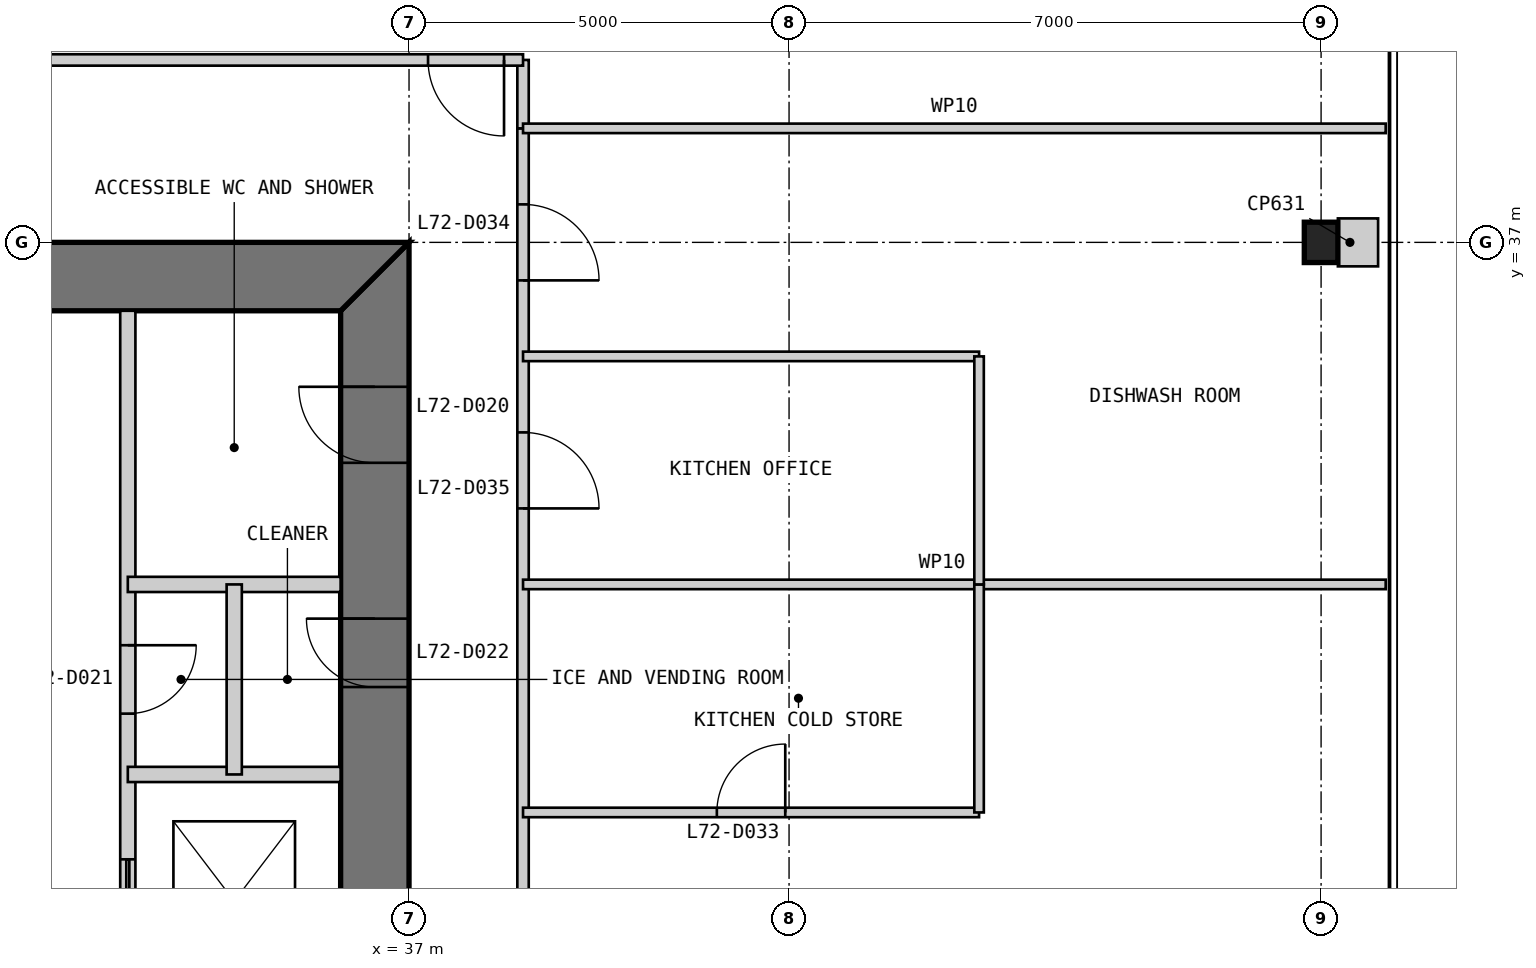
"""IFC4 building model, lengths in metres.
Left out: names, types, materials, properties, quantities, classifications, styles, units other than length and angle.
Written with IfcOpenShell. Run it as: python <this file> out.ifc"""

import sys

from ifc_helpers import new_model, si_unit, direction, frame, frame_2d, origin, origin_2d, place, context, subcontext, project, spatial, polyline, rectangle, i_section, outline, extrude, element, fill, save


model = new_model("IFC4")
c1 = context("Model", 3, precision=1e-05, world=origin(), true_north=direction((0.0, 1.0)))
c2 = subcontext(c1, "Body", "Model", "MODEL_VIEW")
j1 = project(units=[si_unit("LENGTHUNIT", "METRE"), si_unit("PLANEANGLEUNIT", "RADIAN")], contexts=[c1])
p1 = place(None, origin())
s1 = spatial("IfcSite", under=j1, at=p1, CompositionType="ELEMENT")
p2 = place(p1, origin())
s2 = spatial("IfcBuilding", under=s1, at=p2, CompositionType="ELEMENT")
p3 = place(p2, frame((0.0, 0.0, 296.8)))
s3 = spatial("IfcBuildingStorey", under=s2, at=p3, CompositionType="ELEMENT", Elevation=296.8)
p4 = place(p3, frame((49.0, 37.0, 0.0), z_axis=(0.0, 0.0, 1.0), x_axis=(1.0, 0.0, 0.0)))
e1 = element("IfcColumn", 1, at=p4, inside=s3, PredefinedType="COLUMN", context=c2, shape_type="SweptSolid", body=[
    extrude(i_section(OverallWidth=0.442, OverallDepth=0.531, WebThickness=0.066, FlangeThickness=0.106, at=origin_2d()), origin(), (0.0, 0.0, 1.0), 5.0),
])
p5 = place(p3, frame((36.55, 13.9, 0.0), z_axis=(0.0, 0.0, 1.0), x_axis=(0.0, 1.0, 0.0)))
e2 = element("IfcWall", 2, at=p5, inside=s3, PredefinedType="SHEAR", context=c2, shape_type="SweptSolid", body=[
    extrude(outline(polyline([(-0.9, -0.45), (23.1, -0.45), (22.2, 0.45), (0.0, 0.45), (-0.9, -0.45)])), origin(), (0.0, 0.0, 1.0), 5.0),
])
p6 = place(p5, frame((20.2, 0.0, 0.0)))
e3 = element("IfcOpeningElement", 3, at=p6, cuts=e2, PredefinedType="OPENING", context=c2, shape_type="SweptSolid", body=[
    extrude(rectangle(XDim=1.0, YDim=2.2, at=frame_2d((0.5, 1.1))), frame((0.0, 0.46, 0.0), z_axis=(0.0, -1.0, 0.0), x_axis=(1.0, 0.0, 0.0)), (0.0, 0.0, 1.0), 0.92),
])
p7 = place(p5, frame((17.25, 0.0, 0.0)))
e4 = element("IfcOpeningElement", 4, at=p7, cuts=e2, PredefinedType="OPENING", context=c2, shape_type="SweptSolid", body=[
    extrude(rectangle(XDim=0.9, YDim=2.2, at=frame_2d((0.45, 1.1))), frame((0.0, 0.46, 0.0), z_axis=(0.0, -1.0, 0.0), x_axis=(1.0, 0.0, 0.0)), (0.0, 0.0, 1.0), 0.92),
])
p8 = place(p3, frame((37.0, 36.55, 0.0), z_axis=(0.0, 0.0, 1.0), x_axis=(-1.0, 0.0, 0.0)))
e5 = element("IfcWall", 5, at=p8, inside=s3, PredefinedType="SHEAR", context=c2, shape_type="SweptSolid", body=[
    extrude(outline(polyline([(0.0, -0.45), (24.0, -0.45), (23.1, 0.45), (0.9, 0.45), (0.0, -0.45)])), origin(), (0.0, 0.0, 1.0), 5.0),
])
p9 = place(p8, frame((4.9, 0.0, 0.0)))
e6 = element("IfcOpeningElement", 6, at=p9, cuts=e5, PredefinedType="OPENING", context=c2, shape_type="SweptSolid", body=[
    extrude(rectangle(XDim=1.0, YDim=2.2, at=frame_2d((0.5, 1.1))), frame((0.0, 0.46, 0.0), z_axis=(0.0, -1.0, 0.0), x_axis=(1.0, 0.0, 0.0)), (0.0, 0.0, 1.0), 0.92),
])
p10 = place(p8, frame((8.9, 0.0, 0.0)))
e7 = element("IfcOpeningElement", 7, at=p10, cuts=e5, PredefinedType="OPENING", context=c2, shape_type="SweptSolid", body=[
    extrude(rectangle(XDim=1.1, YDim=2.2, at=frame_2d((0.55, 1.1))), frame((0.0, 0.46, 0.0), z_axis=(0.0, -1.0, 0.0), x_axis=(1.0, 0.0, 0.0)), (0.0, 0.0, 1.0), 0.92),
])
p11 = place(p8, frame((15.05, 0.0, 0.0)))
e8 = element("IfcOpeningElement", 8, at=p11, cuts=e5, PredefinedType="OPENING", context=c2, shape_type="SweptSolid", body=[
    extrude(rectangle(XDim=0.9, YDim=2.2, at=frame_2d((0.45, 1.1))), frame((0.0, 0.46, 0.0), z_axis=(0.0, -1.0, 0.0), x_axis=(1.0, 0.0, 0.0)), (0.0, 0.0, 1.0), 0.92),
])
p12 = place(p8, frame((17.9, 0.0, 0.0)))
e9 = element("IfcOpeningElement", 9, at=p12, cuts=e5, PredefinedType="OPENING", context=c2, shape_type="SweptSolid", body=[
    extrude(rectangle(XDim=1.0, YDim=2.2, at=frame_2d((0.5, 1.1))), frame((0.0, 0.46, 0.0), z_axis=(0.0, -1.0, 0.0), x_axis=(1.0, 0.0, 0.0)), (0.0, 0.0, 1.0), 0.92),
])
p13 = place(p8, frame((21.4, 0.0, 0.0)))
e10 = element("IfcOpeningElement", 10, at=p13, cuts=e5, PredefinedType="OPENING", context=c2, shape_type="SweptSolid", body=[
    extrude(rectangle(XDim=1.0, YDim=2.2, at=frame_2d((0.5, 1.1))), frame((0.0, 0.46, 0.0), z_axis=(0.0, -1.0, 0.0), x_axis=(1.0, 0.0, 0.0)), (0.0, 0.0, 1.0), 0.92),
])
p14 = place(p3, frame((33.3, 36.1, 0.0), z_axis=(0.0, 0.0, 1.0), x_axis=(0.0, -1.0, 0.0)))
e11 = element("IfcWall", 11, at=p14, inside=s3, PredefinedType="PARTITIONING", context=c2, shape_type="SweptSolid", body=[
    extrude(rectangle(XDim=16.1, YDim=0.2, at=frame_2d((8.05, 0.0))), origin(), (0.0, 0.0, 1.0), 4.8),
])
p15 = place(p14, frame((4.4, 0.0, 0.0)))
e12 = element("IfcOpeningElement", 12, at=p15, cuts=e11, PredefinedType="OPENING", context=c2, shape_type="SweptSolid", body=[
    extrude(rectangle(XDim=0.9, YDim=2.2, at=frame_2d((0.45, 1.1))), frame((0.0, 0.11, 0.0), z_axis=(0.0, -1.0, 0.0), x_axis=(1.0, 0.0, 0.0)), (0.0, 0.0, 1.0), 0.22),
])
p16 = place(p14, frame((7.217, 0.0, 0.0)))
e13 = element("IfcOpeningElement", 13, at=p16, cuts=e11, PredefinedType="OPENING", context=c2, shape_type="SweptSolid", body=[
    extrude(rectangle(XDim=1.1, YDim=2.2, at=frame_2d((0.55, 1.1))), frame((0.0, 0.11, 0.0), z_axis=(0.0, -1.0, 0.0), x_axis=(1.0, 0.0, 0.0)), (0.0, 0.0, 1.0), 0.22),
])
p17 = place(p14, frame((10.55, 0.0, 0.0)))
e14 = element("IfcOpeningElement", 14, at=p17, cuts=e11, PredefinedType="OPENING", context=c2, shape_type="SweptSolid", body=[
    extrude(rectangle(XDim=1.1, YDim=2.2, at=frame_2d((0.55, 1.1))), frame((0.0, 0.11, 0.0), z_axis=(0.0, -1.0, 0.0), x_axis=(1.0, 0.0, 0.0)), (0.0, 0.0, 1.0), 0.22),
])
p18 = place(p14, frame((13.883, 0.0, 0.0)))
e15 = element("IfcOpeningElement", 15, at=p18, cuts=e11, PredefinedType="OPENING", context=c2, shape_type="SweptSolid", body=[
    extrude(rectangle(XDim=1.1, YDim=2.2, at=frame_2d((0.55, 1.1))), frame((0.0, 0.11, 0.0), z_axis=(0.0, -1.0, 0.0), x_axis=(1.0, 0.0, 0.0)), (0.0, 0.0, 1.0), 0.22),
])
for number, where, z_axis, x_axis in (
    (16, (36.1, 30.0, 0.0), (0.0, 0.0, 1.0), (-1.0, 0.0, 0.0)),
    (17, (36.1, 32.5, 0.0), (0.0, 0.0, 1.0), (-1.0, 0.0, 0.0)),
):
    element("IfcWall", number, at=place(p3, frame(where, z_axis=z_axis, x_axis=x_axis)), inside=s3, PredefinedType="PARTITIONING", context=c2, shape_type="SweptSolid", body=[
        extrude(rectangle(XDim=2.8, YDim=0.2, at=frame_2d((1.4, 0.0))), origin(), (0.0, 0.0, 1.0), 4.8),
    ])
p19 = place(p3, frame((34.7, 32.5, 0.0), z_axis=(0.0, 0.0, 1.0), x_axis=(0.0, -1.0, 0.0)))
e18 = element("IfcWall", 18, at=p19, inside=s3, PredefinedType="PARTITIONING", context=c2, shape_type="SweptSolid", body=[
    extrude(rectangle(XDim=2.5, YDim=0.2, at=frame_2d((1.25, 0.0))), origin(), (0.0, 0.0, 1.0), 4.8),
])
p20 = place(p3, frame((38.5, 11.5, 0.0), z_axis=(0.0, 0.0, 1.0), x_axis=(0.0, 1.0, 0.0)))
e19 = element("IfcWall", 19, at=p20, inside=s3, PredefinedType="PARTITIONING", context=c2, shape_type="SweptSolid", body=[
    extrude(rectangle(XDim=27.0, YDim=0.15, at=frame_2d((13.5, 0.0))), origin(), (0.0, 0.0, 1.0), 4.8),
])
p21 = place(p20, frame((8.5, 0.0, 0.0)))
e20 = element("IfcOpeningElement", 20, at=p21, cuts=e19, PredefinedType="OPENING", context=c2, shape_type="SweptSolid", body=[
    extrude(rectangle(XDim=1.0, YDim=2.2, at=frame_2d((0.5, 1.1))), frame((0.0, 0.085, 0.0), z_axis=(0.0, -1.0, 0.0), x_axis=(1.0, 0.0, 0.0)), (0.0, 0.0, 1.0), 0.17),
])
p22 = place(p20, frame((25.0, 0.0, 0.0)))
e21 = element("IfcOpeningElement", 21, at=p22, cuts=e19, PredefinedType="OPENING", context=c2, shape_type="SweptSolid", body=[
    extrude(rectangle(XDim=1.0, YDim=2.2, at=frame_2d((0.5, 1.1))), frame((0.0, 0.085, 0.0), z_axis=(0.0, -1.0, 0.0), x_axis=(1.0, 0.0, 0.0)), (0.0, 0.0, 1.0), 0.17),
])
p23 = place(p20, frame((22.0, 0.0, 0.0)))
e22 = element("IfcOpeningElement", 22, at=p23, cuts=e19, PredefinedType="OPENING", context=c2, shape_type="SweptSolid", body=[
    extrude(rectangle(XDim=1.0, YDim=2.2, at=frame_2d((0.5, 1.1))), frame((0.0, 0.085, 0.0), z_axis=(0.0, -1.0, 0.0), x_axis=(1.0, 0.0, 0.0)), (0.0, 0.0, 1.0), 0.17),
])
p24 = place(p3, frame((44.5, 29.5, 0.0), z_axis=(0.0, 0.0, 1.0), x_axis=(-1.0, 0.0, 0.0)))
e23 = element("IfcWall", 23, at=p24, inside=s3, PredefinedType="PARTITIONING", context=c2, shape_type="SweptSolid", body=[
    extrude(rectangle(XDim=6.0, YDim=0.125, at=frame_2d((3.0, 0.0))), origin(), (0.0, 0.0, 1.0), 4.8),
])
p25 = place(p24, frame((2.55, 0.0, 0.0)))
e24 = element("IfcOpeningElement", 24, at=p25, cuts=e23, PredefinedType="OPENING", context=c2, shape_type="SweptSolid", body=[
    extrude(rectangle(XDim=0.9, YDim=2.2, at=frame_2d((0.45, 1.1))), frame((0.0, 0.073, 0.0), z_axis=(0.0, -1.0, 0.0), x_axis=(1.0, 0.0, 0.0)), (0.0, 0.0, 1.0), 0.145),
])
p26 = place(p3, frame((49.85, 32.5, 0.0), z_axis=(0.0, 0.0, 1.0), x_axis=(-1.0, 0.0, 0.0)))
e25 = element("IfcWall", 25, at=p26, inside=s3, PredefinedType="PARTITIONING", context=c2, shape_type="SweptSolid", body=[
    extrude(rectangle(XDim=11.35, YDim=0.125, at=frame_2d((5.675, 0.0))), origin(), (0.0, 0.0, 1.0), 4.8),
])
p27 = place(p3, frame((44.5, 35.5, 0.0), z_axis=(0.0, 0.0, 1.0), x_axis=(-1.0, 0.0, 0.0)))
e26 = element("IfcWall", 26, at=p27, inside=s3, PredefinedType="PARTITIONING", context=c2, shape_type="SweptSolid", body=[
    extrude(rectangle(XDim=6.0, YDim=0.125, at=frame_2d((3.0, 0.0))), origin(), (0.0, 0.0, 1.0), 4.8),
])
for number, where, z_axis, x_axis in (
    (27, (44.5, 29.5, 0.0), (0.0, 0.0, 1.0), (0.0, 1.0, 0.0)),
    (28, (44.5, 32.5, 0.0), (0.0, 0.0, 1.0), (0.0, 1.0, 0.0)),
):
    element("IfcWall", number, at=place(p3, frame(where, z_axis=z_axis, x_axis=x_axis)), inside=s3, PredefinedType="PARTITIONING", context=c2, shape_type="SweptSolid", body=[
        extrude(rectangle(XDim=3.0, YDim=0.125, at=frame_2d((1.5, 0.0))), origin(), (0.0, 0.0, 1.0), 4.8),
    ])
p28 = place(p3, frame((38.5, 38.5, 0.0), z_axis=(0.0, 0.0, 1.0), x_axis=(0.0, 1.0, 0.0)))
e29 = element("IfcWall", 29, at=p28, inside=s3, PredefinedType="PARTITIONING", context=c2, shape_type="SweptSolid", body=[
    extrude(rectangle(XDim=0.9, YDim=0.15, at=frame_2d((0.45, 0.0))), origin(), (0.0, 0.0, 1.0), 4.8),
])
p29 = place(p3, frame((38.5, 39.4, 0.0), z_axis=(0.0, 0.0, 1.0), x_axis=(-1.0, 0.0, 0.0)))
e30 = element("IfcWall", 30, at=p29, inside=s3, PredefinedType="PARTITIONING", context=c2, shape_type="SweptSolid", body=[
    extrude(rectangle(XDim=27.0, YDim=0.15, at=frame_2d((13.5, 0.0))), origin(), (0.0, 0.0, 1.0), 4.8),
])
p30 = place(p29, frame((0.25, 0.0, 0.0)))
e31 = element("IfcOpeningElement", 31, at=p30, cuts=e30, PredefinedType="OPENING", context=c2, shape_type="SweptSolid", body=[
    extrude(rectangle(XDim=1.0, YDim=2.2, at=frame_2d((0.5, 1.1))), frame((0.0, 0.085, 0.0), z_axis=(0.0, -1.0, 0.0), x_axis=(1.0, 0.0, 0.0)), (0.0, 0.0, 1.0), 0.17),
])
p31 = place(p29, frame((10.75, 0.0, 0.0)))
e32 = element("IfcOpeningElement", 32, at=p31, cuts=e30, PredefinedType="OPENING", context=c2, shape_type="SweptSolid", body=[
    extrude(rectangle(XDim=1.0, YDim=2.2, at=frame_2d((0.5, 1.1))), frame((0.0, 0.085, 0.0), z_axis=(0.0, -1.0, 0.0), x_axis=(1.0, 0.0, 0.0)), (0.0, 0.0, 1.0), 0.17),
])
p32 = place(p29, frame((13.0, 0.0, 0.0)))
e33 = element("IfcOpeningElement", 33, at=p32, cuts=e30, PredefinedType="OPENING", context=c2, shape_type="SweptSolid", body=[
    extrude(rectangle(XDim=1.0, YDim=2.2, at=frame_2d((0.5, 1.1))), frame((0.0, 0.085, 0.0), z_axis=(0.0, -1.0, 0.0), x_axis=(1.0, 0.0, 0.0)), (0.0, 0.0, 1.0), 0.17),
])
p33 = place(p29, frame((16.0, 0.0, 0.0)))
e34 = element("IfcOpeningElement", 34, at=p33, cuts=e30, PredefinedType="OPENING", context=c2, shape_type="SweptSolid", body=[
    extrude(rectangle(XDim=1.0, YDim=2.2, at=frame_2d((0.5, 1.1))), frame((0.0, 0.085, 0.0), z_axis=(0.0, -1.0, 0.0), x_axis=(1.0, 0.0, 0.0)), (0.0, 0.0, 1.0), 0.17),
])
p34 = place(p29, frame((19.0, 0.0, 0.0)))
e35 = element("IfcOpeningElement", 35, at=p34, cuts=e30, PredefinedType="OPENING", context=c2, shape_type="SweptSolid", body=[
    extrude(rectangle(XDim=1.0, YDim=2.2, at=frame_2d((0.5, 1.1))), frame((0.0, 0.085, 0.0), z_axis=(0.0, -1.0, 0.0), x_axis=(1.0, 0.0, 0.0)), (0.0, 0.0, 1.0), 0.17),
])
p35 = place(p29, frame((23.5, 0.0, 0.0)))
e36 = element("IfcOpeningElement", 36, at=p35, cuts=e30, PredefinedType="OPENING", context=c2, shape_type="SweptSolid", body=[
    extrude(rectangle(XDim=1.0, YDim=2.2, at=frame_2d((0.5, 1.1))), frame((0.0, 0.085, 0.0), z_axis=(0.0, -1.0, 0.0), x_axis=(1.0, 0.0, 0.0)), (0.0, 0.0, 1.0), 0.17),
])
p36 = place(p3, frame((49.85, 38.5, 0.0), z_axis=(0.0, 0.0, 1.0), x_axis=(-1.0, 0.0, 0.0)))
e37 = element("IfcWall", 37, at=p36, inside=s3, PredefinedType="PARTITIONING", context=c2, shape_type="SweptSolid", body=[
    extrude(rectangle(XDim=11.35, YDim=0.125, at=frame_2d((5.675, 0.0))), origin(), (0.0, 0.0, 1.0), 4.8),
])
p37 = place(p3, frame((49.75, 37.0, 0.0), z_axis=(0.0, 0.0, 1.0), x_axis=(-1.0, 0.0, 0.0)))
e38 = element("IfcWall", 38, at=p37, inside=s3, PredefinedType="PARTITIONING", context=c2, shape_type="SweptSolid", body=[
    extrude(rectangle(XDim=0.529, YDim=0.631, at=frame_2d((0.265, 0.0))), origin(), (0.0, 0.0, 1.0), 4.8),
])
p38 = place(p6, origin())
e39 = element("IfcDoor", 39, at=p38, inside=s3, OperationType="SINGLE_SWING_RIGHT", PredefinedType="DOOR", context=c2, shape_type="SweptSolid", body=[
    extrude(rectangle(XDim=1.0, YDim=2.2, at=frame_2d((0.5, 1.1))), frame((0.0, 0.025, 0.0), z_axis=(0.0, -1.0, 0.0), x_axis=(1.0, 0.0, 0.0)), (0.0, 0.0, 1.0), 0.05),
    extrude(outline(polyline([(0.0, 0.0), (0.04, 0.0), (0.04, 2.16), (0.96, 2.16), (0.96, 0.0), (1.0, 0.0), (1.0, 2.2), (0.0, 2.2), (0.0, 0.0)])), frame((0.0, 0.3, 0.0), z_axis=(0.0, -1.0, 0.0), x_axis=(1.0, 0.0, 0.0)), (0.0, 0.0, 1.0), 0.6),
])
fill(e3, e39)
p39 = place(p15, origin())
e40 = element("IfcDoor", 40, at=p39, inside=s3, OperationType="SINGLE_SWING_LEFT", PredefinedType="DOOR", context=c2, shape_type="SweptSolid", body=[
    extrude(rectangle(XDim=0.9, YDim=2.2, at=frame_2d((0.45, 1.1))), frame((0.0, 0.025, 0.0), z_axis=(0.0, -1.0, 0.0), x_axis=(1.0, 0.0, 0.0)), (0.0, 0.0, 1.0), 0.05),
])
fill(e12, e40)
p40 = place(p7, origin())
e41 = element("IfcDoor", 41, at=p40, inside=s3, OperationType="SINGLE_SWING_RIGHT", PredefinedType="DOOR", context=c2, shape_type="SweptSolid", body=[
    extrude(rectangle(XDim=0.9, YDim=2.2, at=frame_2d((0.45, 1.1))), frame((0.0, 0.025, 0.0), z_axis=(0.0, -1.0, 0.0), x_axis=(1.0, 0.0, 0.0)), (0.0, 0.0, 1.0), 0.05),
    extrude(outline(polyline([(0.0, 0.0), (0.04, 0.0), (0.04, 2.16), (0.86, 2.16), (0.86, 0.0), (0.9, 0.0), (0.9, 2.2), (0.0, 2.2), (0.0, 0.0)])), frame((0.0, 0.3, 0.0), z_axis=(0.0, -1.0, 0.0), x_axis=(1.0, 0.0, 0.0)), (0.0, 0.0, 1.0), 0.6),
])
fill(e4, e41)
p41 = place(p25, frame((0.9, 0.0, 0.0), z_axis=(0.0, 0.0, 1.0), x_axis=(-1.0, 0.0, 0.0)))
e42 = element("IfcDoor", 42, at=p41, inside=s3, OperationType="SINGLE_SWING_RIGHT", PredefinedType="DOOR", context=c2, shape_type="SweptSolid", body=[
    extrude(rectangle(XDim=0.9, YDim=2.2, at=frame_2d((0.45, 1.1))), frame((0.0, 0.025, 0.0), z_axis=(0.0, -1.0, 0.0), x_axis=(1.0, 0.0, 0.0)), (0.0, 0.0, 1.0), 0.05),
])
fill(e24, e42)
p42 = place(p22, frame((1.0, 0.0, 0.0), z_axis=(0.0, 0.0, 1.0), x_axis=(-1.0, 0.0, 0.0)))
e43 = element("IfcDoor", 43, at=p42, inside=s3, OperationType="SINGLE_SWING_RIGHT", PredefinedType="DOOR", context=c2, shape_type="SweptSolid", body=[
    extrude(rectangle(XDim=1.0, YDim=2.2, at=frame_2d((0.5, 1.1))), frame((0.0, 0.025, 0.0), z_axis=(0.0, -1.0, 0.0), x_axis=(1.0, 0.0, 0.0)), (0.0, 0.0, 1.0), 0.05),
])
fill(e21, e43)
p43 = place(p23, frame((1.0, 0.0, 0.0), z_axis=(0.0, 0.0, 1.0), x_axis=(-1.0, 0.0, 0.0)))
e44 = element("IfcDoor", 44, at=p43, inside=s3, OperationType="SINGLE_SWING_RIGHT", PredefinedType="DOOR", context=c2, shape_type="SweptSolid", body=[
    extrude(rectangle(XDim=1.0, YDim=2.2, at=frame_2d((0.5, 1.1))), frame((0.0, 0.025, 0.0), z_axis=(0.0, -1.0, 0.0), x_axis=(1.0, 0.0, 0.0)), (0.0, 0.0, 1.0), 0.05),
])
fill(e22, e44)
p44 = place(p30, origin())
e45 = element("IfcDoor", 45, at=p44, inside=s3, OperationType="SINGLE_SWING_LEFT", PredefinedType="DOOR", context=c2, shape_type="SweptSolid", body=[
    extrude(rectangle(XDim=1.0, YDim=2.2, at=frame_2d((0.5, 1.1))), frame((0.0, 0.025, 0.0), z_axis=(0.0, -1.0, 0.0), x_axis=(1.0, 0.0, 0.0)), (0.0, 0.0, 1.0), 0.05),
])
fill(e31, e45)
p45 = place(p16, origin())
e46 = element("IfcDoor", 46, at=p45, inside=s3, OperationType="DOUBLE_DOOR_SLIDING", PredefinedType="DOOR", context=c2, shape_type="SweptSolid", body=[
    extrude(rectangle(XDim=1.1, YDim=2.2, at=frame_2d((0.55, 1.1))), frame((0.0, 0.025, 0.0), z_axis=(0.0, -1.0, 0.0), x_axis=(1.0, 0.0, 0.0)), (0.0, 0.0, 1.0), 0.05),
])
fill(e13, e46)
save(model, sys.argv[1])
